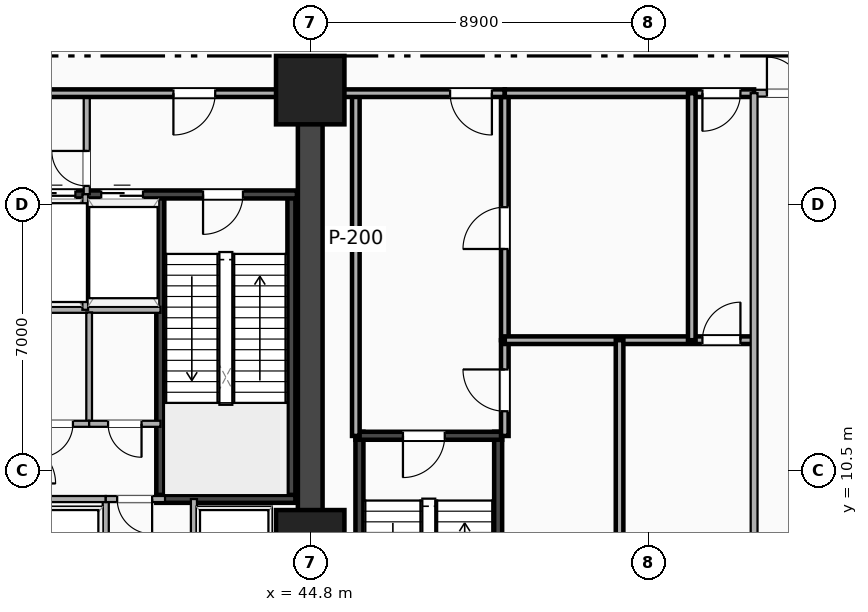
"""IFC4 building model, lengths in metres.
Left out: names, types, materials, properties, quantities, classifications, styles, units other than length and angle.
Written with IfcOpenShell. Run it as: python <this file> out.ifc"""

import sys

from ifc_helpers import new_model, si_unit, direction, frame, frame_2d, origin, origin_2d, place, context, subcontext, project, spatial, rectangle, extrude, element, fill, save


model = new_model("IFC4")
c1 = context("Model", 3, precision=1e-05, world=origin(), true_north=direction((0.0, 1.0)))
c2 = subcontext(c1, "Body", "Model", "MODEL_VIEW")
j1 = project(units=[si_unit("LENGTHUNIT", "METRE"), si_unit("PLANEANGLEUNIT", "RADIAN")], contexts=[c1])
p1 = place(None, origin())
s1 = spatial("IfcSite", under=j1, at=p1, CompositionType="ELEMENT")
p2 = place(p1, origin())
s2 = spatial("IfcBuilding", under=s1, at=p2, CompositionType="ELEMENT")
p3 = place(p2, origin())
s3 = spatial("IfcBuildingStorey", under=s2, at=p3, CompositionType="ELEMENT", Elevation=0.0)
p4 = place(p3, frame((44.8, 3.5, 0.0), z_axis=(0.0, 0.0, 1.0), x_axis=(0.0, 1.0, 0.0)))
e1 = element("IfcWall", 1, at=p4, inside=s3, PredefinedType="SHEAR", context=c2, shape_type="SweptSolid", body=[
    extrude(rectangle(XDim=16.9, YDim=0.65, at=frame_2d((8.45, 0.0))), origin(), (0.0, 0.0, 1.0), 5.1),
])
for number, where, z_axis, x_axis in (
    (2, (40.855, 9.745, 0.0), (0.0, 0.0, 1.0), (0.0, 1.0, 0.0)),
    (3, (44.305, 9.745, 0.0), (0.0, 0.0, 1.0), (0.0, 1.0, 0.0)),
):
    element("IfcWall", number, at=place(p3, frame(where, z_axis=z_axis, x_axis=x_axis)), inside=s3, PredefinedType="SHEAR", context=c2, shape_type="SweptSolid", body=[
        extrude(rectangle(XDim=8.01, YDim=0.21, at=frame_2d((4.005, 0.0))), origin(), (0.0, 0.0, 1.0), 5.1),
    ])
p5 = place(p3, frame((40.75, 9.745, 0.0), z_axis=(0.0, 0.0, 1.0), x_axis=(1.0, 0.0, 0.0)))
e4 = element("IfcWall", 4, at=p5, inside=s3, PredefinedType="SHEAR", context=c2, shape_type="SweptSolid", body=[
    extrude(rectangle(XDim=3.66, YDim=0.21, at=frame_2d((1.83, 0.0))), origin(), (0.0, 0.0, 1.0), 5.1),
])
p6 = place(p3, frame((37.25, 17.755, 0.0), z_axis=(0.0, 0.0, 1.0), x_axis=(1.0, 0.0, 0.0)))
e5 = element("IfcWall", 5, at=p6, inside=s3, PredefinedType="SHEAR", context=c2, shape_type="SweptSolid", body=[
    extrude(rectangle(XDim=7.2, YDim=0.21, at=frame_2d((3.6, 0.0))), origin(), (0.0, 0.0, 1.0), 5.1),
])
p7 = place(p6, frame((0.25, 0.0, 0.0)))
e6 = element("IfcOpeningElement", 6, at=p7, cuts=e5, PredefinedType="OPENING", context=c2, shape_type="SweptSolid", body=[
    extrude(rectangle(XDim=1.12, YDim=2.2, at=frame_2d((0.56, 1.1))), frame((0.0, 0.115, 0.0), z_axis=(0.0, -1.0, 0.0), x_axis=(1.0, 0.0, 0.0)), (0.0, 0.0, 1.0), 0.23),
])
p8 = place(p6, frame((2.05, 0.0, 0.0)))
e7 = element("IfcOpeningElement", 7, at=p8, cuts=e5, PredefinedType="OPENING", context=c2, shape_type="SweptSolid", body=[
    extrude(rectangle(XDim=1.1, YDim=2.18, at=frame_2d((0.55, 1.09))), frame((0.0, 0.115, 0.0), z_axis=(0.0, -1.0, 0.0), x_axis=(1.0, 0.0, 0.0)), (0.0, 0.0, 1.0), 0.23),
])
p9 = place(p6, frame((4.73, 0.0, 0.0)))
e8 = element("IfcOpeningElement", 8, at=p9, cuts=e5, PredefinedType="OPENING", context=c2, shape_type="SweptSolid", body=[
    extrude(rectangle(XDim=1.05, YDim=2.15, at=frame_2d((0.525, 1.075))), frame((0.0, 0.115, 0.0), z_axis=(0.0, -1.0, 0.0), x_axis=(1.0, 0.0, 0.0)), (0.0, 0.0, 1.0), 0.23),
])
for number, where, z_axis, x_axis in (
    (9, (46.095, 2.64, 0.0), (0.0, 0.0, 1.0), (0.0, 1.0, 0.0)),
    (10, (49.745, 2.64, 0.0), (0.0, 0.0, 1.0), (0.0, 1.0, 0.0)),
):
    element("IfcWall", number, at=place(p3, frame(where, z_axis=z_axis, x_axis=x_axis)), inside=s3, PredefinedType="SHEAR", context=c2, shape_type="SweptSolid", body=[
        extrude(rectangle(XDim=8.87, YDim=0.21, at=frame_2d((4.435, 0.0))), origin(), (0.0, 0.0, 1.0), 5.1),
    ])
p10 = place(p3, frame((45.99, 11.405, 0.0), z_axis=(0.0, 0.0, 1.0), x_axis=(1.0, 0.0, 0.0)))
e11 = element("IfcWall", 11, at=p10, inside=s3, PredefinedType="SHEAR", context=c2, shape_type="SweptSolid", body=[
    extrude(rectangle(XDim=3.86, YDim=0.21, at=frame_2d((1.93, 0.0))), origin(), (0.0, 0.0, 1.0), 5.1),
])
p11 = place(p10, frame((1.25, 0.0, 0.0)))
e12 = element("IfcOpeningElement", 12, at=p11, cuts=e11, PredefinedType="OPENING", context=c2, shape_type="SweptSolid", body=[
    extrude(rectangle(XDim=1.1, YDim=2.15, at=frame_2d((0.55, 1.075))), frame((0.0, 0.115, 0.0), z_axis=(0.0, -1.0, 0.0), x_axis=(1.0, 0.0, 0.0)), (0.0, 0.0, 1.0), 0.23),
])
for number, where, z_axis, x_axis in (
    (13, (44.8, 8.55, -0.35), (0.0, 0.0, 1.0), (1.0, 0.0, 0.0)),
    (14, (44.8, 20.5, -0.35), (0.0, 0.0, 1.0), (1.0, 0.0, 0.0)),
):
    element("IfcColumn", number, at=place(p3, frame(where, z_axis=z_axis, x_axis=x_axis)), inside=s3, PredefinedType="COLUMN", context=c2, shape_type="SweptSolid", body=[
        extrude(rectangle(XDim=1.8, YDim=1.8, at=origin_2d()), origin(), (0.0, 0.0, 1.0), 5.45),
    ])
p12 = place(p3, frame((38.92, 17.76, 0.0), z_axis=(0.0, 0.0, 1.0), x_axis=(0.0, 1.0, 0.0)))
e15 = element("IfcWall", 15, at=p12, inside=s3, PredefinedType="PARTITIONING", context=c2, shape_type="SweptSolid", body=[
    extrude(rectangle(XDim=2.66, YDim=0.16, at=frame_2d((1.33, 0.0))), origin(), (0.0, 0.0, 1.0), 4.164),
])
p13 = place(p12, frame((1.14, 0.0, 0.0), z_axis=(0.0, 0.0, 1.0), x_axis=(-1.0, 0.0, 0.0)))
e16 = element("IfcOpeningElement", 16, at=p13, cuts=e15, PredefinedType="OPENING", context=c2, shape_type="SweptSolid", body=[
    extrude(rectangle(XDim=0.92, YDim=2.08, at=frame_2d((0.46, 1.04))), frame((0.0, 0.09, 0.0), z_axis=(0.0, -1.0, 0.0), x_axis=(1.0, 0.0, 0.0)), (0.0, 0.0, 1.0), 0.18),
])
p14 = place(p3, frame((37.25, 14.72, 0.0), z_axis=(0.0, 0.0, 1.0), x_axis=(1.0, 0.0, 0.0)))
e17 = element("IfcWall", 17, at=p14, inside=s3, PredefinedType="PARTITIONING", context=c2, shape_type="SweptSolid", body=[
    extrude(rectangle(XDim=3.61, YDim=0.16, at=frame_2d((1.805, 0.0))), origin(), (0.0, 0.0, 1.0), 4.23),
])
p15 = place(p3, frame((38.88, 14.72, 0.0), z_axis=(0.0, 0.0, 1.0), x_axis=(0.0, 1.0, 0.0)))
e18 = element("IfcWall", 18, at=p15, inside=s3, PredefinedType="PARTITIONING", context=c2, shape_type="SweptSolid", body=[
    extrude(rectangle(XDim=3.04, YDim=0.15, at=frame_2d((1.52, 0.0))), origin(), (0.0, 0.0, 1.0), 5.1),
])
p16 = place(p3, frame((37.0, 20.42, 0.0), z_axis=(0.0, 0.0, 1.0), x_axis=(1.0, 0.0, 0.0)))
e19 = element("IfcWall", 19, at=p16, inside=s3, PredefinedType="PARTITIONING", context=c2, shape_type="SweptSolid", body=[
    extrude(rectangle(XDim=7.45, YDim=0.2, at=frame_2d((3.725, 0.0))), origin(), (0.0, 0.0, 1.0), 4.164),
])
p17 = place(p16, frame((4.2, 0.0, 0.0)))
e20 = element("IfcOpeningElement", 20, at=p17, cuts=e19, PredefinedType="OPENING", context=c2, shape_type="SweptSolid", body=[
    extrude(rectangle(XDim=1.1, YDim=2.15, at=frame_2d((0.55, 1.075))), frame((0.0, 0.11, 0.0), z_axis=(0.0, -1.0, 0.0), x_axis=(1.0, 0.0, 0.0)), (0.0, 0.0, 1.0), 0.22),
])
p18 = place(p3, frame((38.983, 11.72, 0.0), z_axis=(0.0, 0.0, 1.0), x_axis=(0.0, 1.0, 0.0)))
e21 = element("IfcWall", 21, at=p18, inside=s3, PredefinedType="PARTITIONING", context=c2, shape_type="SweptSolid", body=[
    extrude(rectangle(XDim=2.93, YDim=0.15, at=frame_2d((1.465, 0.0))), origin(), (0.0, 0.0, 1.0), 5.1),
])
p19 = place(p3, frame((37.25, 11.72, 0.0), z_axis=(0.0, 0.0, 1.0), x_axis=(1.0, 0.0, 0.0)))
e22 = element("IfcWall", 22, at=p19, inside=s3, PredefinedType="PARTITIONING", context=c2, shape_type="SweptSolid", body=[
    extrude(rectangle(XDim=1.733, YDim=0.16, at=frame_2d((0.866, 0.0))), origin(), (0.0, 0.0, 1.0), 4.23),
])
p20 = place(p19, frame((0.427, 0.0, 0.0)))
e23 = element("IfcOpeningElement", 23, at=p20, cuts=e22, PredefinedType="OPENING", context=c2, shape_type="SweptSolid", body=[
    extrude(rectangle(XDim=0.88, YDim=2.08, at=frame_2d((0.44, 1.04))), frame((0.0, 0.09, 0.0), z_axis=(0.0, -1.0, 0.0), x_axis=(1.0, 0.0, 0.0)), (0.0, 0.0, 1.0), 0.18),
])
p21 = place(p3, frame((38.983, 11.72, 0.0), z_axis=(0.0, 0.0, 1.0), x_axis=(1.0, 0.0, 0.0)))
e24 = element("IfcWall", 24, at=p21, inside=s3, PredefinedType="PARTITIONING", context=c2, shape_type="SweptSolid", body=[
    extrude(rectangle(XDim=1.877, YDim=0.16, at=frame_2d((0.938, 0.0))), origin(), (0.0, 0.0, 1.0), 5.1),
])
p22 = place(p21, frame((0.499, 0.0, 0.0)))
e25 = element("IfcOpeningElement", 25, at=p22, cuts=e24, PredefinedType="OPENING", context=c2, shape_type="SweptSolid", body=[
    extrude(rectangle(XDim=0.88, YDim=2.08, at=frame_2d((0.44, 1.04))), frame((0.0, 0.09, 0.0), z_axis=(0.0, -1.0, 0.0), x_axis=(1.0, 0.0, 0.0)), (0.0, 0.0, 1.0), 0.18),
])
p23 = place(p3, frame((39.42, 3.9, 0.0), z_axis=(0.0, 0.0, 1.0), x_axis=(0.0, 1.0, 0.0)))
e26 = element("IfcWall", 26, at=p23, inside=s3, PredefinedType="PARTITIONING", context=c2, shape_type="SweptSolid", body=[
    extrude(rectangle(XDim=5.84, YDim=0.16, at=frame_2d((2.92, 0.0))), origin(), (0.0, 0.0, 1.0), 4.164),
])
p24 = place(p23, frame((1.86, 0.0, 0.0), z_axis=(0.0, 0.0, 1.0), x_axis=(-1.0, 0.0, 0.0)))
e27 = element("IfcOpeningElement", 27, at=p24, cuts=e26, PredefinedType="OPENING", context=c2, shape_type="SweptSolid", body=[
    extrude(rectangle(XDim=1.06, YDim=2.16, at=frame_2d((0.53, 1.08))), frame((0.0, 0.09, 0.0), z_axis=(0.0, -1.0, 0.0), x_axis=(1.0, 0.0, 0.0)), (0.0, 0.0, 1.0), 0.18),
])
p25 = place(p23, frame((4.76, 0.0, 0.0), z_axis=(0.0, 0.0, 1.0), x_axis=(-1.0, 0.0, 0.0)))
e28 = element("IfcOpeningElement", 28, at=p25, cuts=e26, PredefinedType="OPENING", context=c2, shape_type="SweptSolid", body=[
    extrude(rectangle(XDim=1.06, YDim=2.16, at=frame_2d((0.53, 1.08))), frame((0.0, 0.09, 0.0), z_axis=(0.0, -1.0, 0.0), x_axis=(1.0, 0.0, 0.0)), (0.0, 0.0, 1.0), 0.18),
])
p26 = place(p3, frame((41.74, 3.9, 0.0), z_axis=(0.0, 0.0, 1.0), x_axis=(0.0, 1.0, 0.0)))
e29 = element("IfcWall", 29, at=p26, inside=s3, PredefinedType="PARTITIONING", context=c2, shape_type="SweptSolid", body=[
    extrude(rectangle(XDim=5.84, YDim=0.16, at=frame_2d((2.92, 0.0))), origin(), (0.0, 0.0, 1.0), 4.164),
])
p27 = place(p26, frame((0.8, 0.0, 0.0)))
e30 = element("IfcOpeningElement", 30, at=p27, cuts=e29, PredefinedType="OPENING", context=c2, shape_type="SweptSolid", body=[
    extrude(rectangle(XDim=1.06, YDim=2.16, at=frame_2d((0.53, 1.08))), frame((0.0, 0.09, 0.0), z_axis=(0.0, -1.0, 0.0), x_axis=(1.0, 0.0, 0.0)), (0.0, 0.0, 1.0), 0.18),
])
p28 = place(p26, frame((3.7, 0.0, 0.0)))
e31 = element("IfcOpeningElement", 31, at=p28, cuts=e29, PredefinedType="OPENING", context=c2, shape_type="SweptSolid", body=[
    extrude(rectangle(XDim=1.06, YDim=2.16, at=frame_2d((0.53, 1.08))), frame((0.0, 0.09, 0.0), z_axis=(0.0, -1.0, 0.0), x_axis=(1.0, 0.0, 0.0)), (0.0, 0.0, 1.0), 0.18),
])
p29 = place(p3, frame((37.25, 9.74, 0.0), z_axis=(0.0, 0.0, 1.0), x_axis=(1.0, 0.0, 0.0)))
e32 = element("IfcWall", 32, at=p29, inside=s3, PredefinedType="PARTITIONING", context=c2, shape_type="SweptSolid", body=[
    extrude(rectangle(XDim=2.17, YDim=0.16, at=frame_2d((1.085, 0.0))), origin(), (0.0, 0.0, 1.0), 4.23),
])
p30 = place(p3, frame((39.42, 9.74, 0.0), z_axis=(0.0, 0.0, 1.0), x_axis=(1.0, 0.0, 0.0)))
e33 = element("IfcWall", 33, at=p30, inside=s3, PredefinedType="PARTITIONING", context=c2, shape_type="SweptSolid", body=[
    extrude(rectangle(XDim=1.56, YDim=0.16, at=frame_2d((0.78, 0.0))), origin(), (0.0, 0.0, 1.0), 5.1),
])
p31 = place(p30, frame((0.3, 0.0, 0.0)))
e34 = element("IfcOpeningElement", 34, at=p31, cuts=e33, PredefinedType="OPENING", context=c2, shape_type="SweptSolid", body=[
    extrude(rectangle(XDim=0.92, YDim=2.08, at=frame_2d((0.46, 1.04))), frame((0.0, 0.09, 0.0), z_axis=(0.0, -1.0, 0.0), x_axis=(1.0, 0.0, 0.0)), (0.0, 0.0, 1.0), 0.18),
])
p32 = place(p3, frame((56.48, 20.42, 0.0), z_axis=(0.0, 0.0, 1.0), x_axis=(1.0, 0.0, 0.0)))
e35 = element("IfcWall", 35, at=p32, inside=s3, PredefinedType="PARTITIONING", context=c2, shape_type="SweptSolid", body=[
    extrude(rectangle(XDim=6.8, YDim=0.18, at=frame_2d((3.4, 0.0))), origin(), (0.0, 0.0, 1.0), 4.164),
])
p33 = place(p32, frame((1.288, 0.0, 0.0), z_axis=(0.0, 0.0, 1.0), x_axis=(-1.0, 0.0, 0.0)))
e36 = element("IfcOpeningElement", 36, at=p33, cuts=e35, PredefinedType="OPENING", context=c2, shape_type="SweptSolid", body=[
    extrude(rectangle(XDim=0.95, YDim=2.15, at=frame_2d((0.475, 1.075))), frame((0.0, 0.1, 0.0), z_axis=(0.0, -1.0, 0.0), x_axis=(1.0, 0.0, 0.0)), (0.0, 0.0, 1.0), 0.2),
])
p34 = place(p3, frame((46.0, 11.4, 0.0), z_axis=(0.0, 0.0, 1.0), x_axis=(0.0, 1.0, 0.0)))
e37 = element("IfcWall", 37, at=p34, inside=s3, PredefinedType="PARTITIONING", context=c2, shape_type="SweptSolid", body=[
    extrude(rectangle(XDim=9.02, YDim=0.2, at=frame_2d((4.51, 0.0))), origin(), (0.0, 0.0, 1.0), 4.164),
])
p35 = place(p3, frame((49.92, 11.4, 0.0), z_axis=(0.0, 0.0, 1.0), x_axis=(0.0, 1.0, 0.0)))
e38 = element("IfcWall", 38, at=p35, inside=s3, PredefinedType="PARTITIONING", context=c2, shape_type="SweptSolid", body=[
    extrude(rectangle(XDim=2.52, YDim=0.2, at=frame_2d((1.26, 0.0))), origin(), (0.0, 0.0, 1.0), 5.1),
])
p36 = place(p35, frame((1.75, 0.0, 0.0), z_axis=(0.0, 0.0, 1.0), x_axis=(-1.0, 0.0, 0.0)))
e39 = element("IfcOpeningElement", 39, at=p36, cuts=e38, PredefinedType="OPENING", context=c2, shape_type="SweptSolid", body=[
    extrude(rectangle(XDim=1.1, YDim=2.15, at=frame_2d((0.55, 1.075))), frame((0.0, 0.11, 0.0), z_axis=(0.0, -1.0, 0.0), x_axis=(1.0, 0.0, 0.0)), (0.0, 0.0, 1.0), 0.22),
])
p37 = place(p3, frame((49.92, 13.92, 0.0), z_axis=(0.0, 0.0, 1.0), x_axis=(0.0, 1.0, 0.0)))
e40 = element("IfcWall", 40, at=p37, inside=s3, PredefinedType="PARTITIONING", context=c2, shape_type="SweptSolid", body=[
    extrude(rectangle(XDim=6.5, YDim=0.2, at=frame_2d((3.25, 0.0))), origin(), (0.0, 0.0, 1.0), 4.164),
])
p38 = place(p37, frame((3.5, 0.0, 0.0), z_axis=(0.0, 0.0, 1.0), x_axis=(-1.0, 0.0, 0.0)))
e41 = element("IfcOpeningElement", 41, at=p38, cuts=e40, PredefinedType="OPENING", context=c2, shape_type="SweptSolid", body=[
    extrude(rectangle(XDim=1.1, YDim=2.15, at=frame_2d((0.55, 1.075))), frame((0.0, 0.11, 0.0), z_axis=(0.0, -1.0, 0.0), x_axis=(1.0, 0.0, 0.0)), (0.0, 0.0, 1.0), 0.22),
])
p39 = place(p3, frame((44.8, 20.42, 0.0), z_axis=(0.0, 0.0, 1.0), x_axis=(1.0, 0.0, 0.0)))
e42 = element("IfcWall", 42, at=p39, inside=s3, PredefinedType="PARTITIONING", context=c2, shape_type="SweptSolid", body=[
    extrude(rectangle(XDim=5.12, YDim=0.2, at=frame_2d((2.56, 0.0))), origin(), (0.0, 0.0, 1.0), 4.164),
])
p40 = place(p39, frame((3.681, 0.0, 0.0)))
e43 = element("IfcOpeningElement", 43, at=p40, cuts=e42, PredefinedType="OPENING", context=c2, shape_type="SweptSolid", body=[
    extrude(rectangle(XDim=1.1, YDim=2.15, at=frame_2d((0.55, 1.075))), frame((0.0, 0.11, 0.0), z_axis=(0.0, -1.0, 0.0), x_axis=(1.0, 0.0, 0.0)), (0.0, 0.0, 1.0), 0.22),
])
p41 = place(p3, frame((49.92, 20.42, 0.0), z_axis=(0.0, 0.0, 1.0), x_axis=(1.0, 0.0, 0.0)))
e44 = element("IfcWall", 44, at=p41, inside=s3, PredefinedType="PARTITIONING", context=c2, shape_type="SweptSolid", body=[
    extrude(rectangle(XDim=6.56, YDim=0.2, at=frame_2d((3.28, 0.0))), origin(), (0.0, 0.0, 1.0), 4.164),
])
p42 = place(p41, frame((5.2, 0.0, 0.0)))
e45 = element("IfcOpeningElement", 45, at=p42, cuts=e44, PredefinedType="OPENING", context=c2, shape_type="SweptSolid", body=[
    extrude(rectangle(XDim=1.0, YDim=2.15, at=frame_2d((0.5, 1.075))), frame((0.0, 0.11, 0.0), z_axis=(0.0, -1.0, 0.0), x_axis=(1.0, 0.0, 0.0)), (0.0, 0.0, 1.0), 0.22),
])
p43 = place(p3, frame((49.92, 13.92, 0.0), z_axis=(0.0, 0.0, 1.0), x_axis=(1.0, 0.0, 0.0)))
e46 = element("IfcWall", 46, at=p43, inside=s3, PredefinedType="PARTITIONING", context=c2, shape_type="SweptSolid", body=[
    extrude(rectangle(XDim=6.56, YDim=0.2, at=frame_2d((3.28, 0.0))), origin(), (0.0, 0.0, 1.0), 5.1),
])
p44 = place(p43, frame((6.2, 0.0, 0.0), z_axis=(0.0, 0.0, 1.0), x_axis=(-1.0, 0.0, 0.0)))
e47 = element("IfcOpeningElement", 47, at=p44, cuts=e46, PredefinedType="OPENING", context=c2, shape_type="SweptSolid", body=[
    extrude(rectangle(XDim=1.0, YDim=2.15, at=frame_2d((0.5, 1.075))), frame((0.0, 0.11, 0.0), z_axis=(0.0, -1.0, 0.0), x_axis=(1.0, 0.0, 0.0)), (0.0, 0.0, 1.0), 0.22),
])
p45 = place(p3, frame((56.48, 0.35, 0.0), z_axis=(0.0, 0.0, 1.0), x_axis=(0.0, 1.0, 0.0)))
e48 = element("IfcWall", 48, at=p45, inside=s3, PredefinedType="PARTITIONING", context=c2, shape_type="SweptSolid", body=[
    extrude(rectangle(XDim=20.07, YDim=0.18, at=frame_2d((10.035, 0.0))), origin(), (0.0, 0.0, 1.0), 4.164),
])
p46 = place(p3, frame((52.94, 0.35, 0.0), z_axis=(0.0, 0.0, 1.0), x_axis=(0.0, 1.0, 0.0)))
e49 = element("IfcWall", 49, at=p46, inside=s3, PredefinedType="PARTITIONING", context=c2, shape_type="SweptSolid", body=[
    extrude(rectangle(XDim=13.57, YDim=0.2, at=frame_2d((6.785, 0.0))), origin(), (0.0, 0.0, 1.0), 2.735),
])
p47 = place(p3, frame((54.84, 13.92, 0.0), z_axis=(0.0, 0.0, 1.0), x_axis=(0.0, 1.0, 0.0)))
e50 = element("IfcWall", 50, at=p47, inside=s3, PredefinedType="PARTITIONING", context=c2, shape_type="SweptSolid", body=[
    extrude(rectangle(XDim=6.5, YDim=0.2, at=frame_2d((3.25, 0.0))), origin(), (0.0, 0.0, 1.0), 4.164),
])
p48 = place(p7, origin())
e51 = element("IfcDoor", 51, at=p48, inside=s3, OperationType="DOUBLE_DOOR_SLIDING", PredefinedType="DOOR", context=c2, shape_type="SweptSolid", body=[
    extrude(rectangle(XDim=1.12, YDim=2.2, at=frame_2d((0.56, 1.1))), frame((0.0, 0.025, 0.0), z_axis=(0.0, -1.0, 0.0), x_axis=(1.0, 0.0, 0.0)), (0.0, 0.0, 1.0), 0.05),
])
fill(e6, e51)
p49 = place(p8, origin())
e52 = element("IfcDoor", 52, at=p49, inside=s3, OperationType="DOUBLE_DOOR_SLIDING", PredefinedType="DOOR", context=c2, shape_type="SweptSolid", body=[
    extrude(rectangle(XDim=1.1, YDim=2.18, at=frame_2d((0.55, 1.09))), frame((0.0, 0.025, 0.0), z_axis=(0.0, -1.0, 0.0), x_axis=(1.0, 0.0, 0.0)), (0.0, 0.0, 1.0), 0.05),
])
fill(e7, e52)
p50 = place(p9, origin())
e53 = element("IfcDoor", 53, at=p50, inside=s3, OperationType="SINGLE_SWING_LEFT", PredefinedType="DOOR", context=c2, shape_type="SweptSolid", body=[
    extrude(rectangle(XDim=1.05, YDim=2.15, at=frame_2d((0.525, 1.075))), frame((0.0, 0.025, 0.0), z_axis=(0.0, -1.0, 0.0), x_axis=(1.0, 0.0, 0.0)), (0.0, 0.0, 1.0), 0.05),
])
fill(e8, e53)
p51 = place(p11, origin())
e54 = element("IfcDoor", 54, at=p51, inside=s3, OperationType="SINGLE_SWING_LEFT", PredefinedType="DOOR", context=c2, shape_type="SweptSolid", body=[
    extrude(rectangle(XDim=1.1, YDim=2.15, at=frame_2d((0.55, 1.075))), frame((0.0, 0.025, 0.0), z_axis=(0.0, -1.0, 0.0), x_axis=(1.0, 0.0, 0.0)), (0.0, 0.0, 1.0), 0.05),
])
fill(e12, e54)
p52 = place(p13, origin())
e55 = element("IfcDoor", 55, at=p52, inside=s3, OperationType="SINGLE_SWING_RIGHT", PredefinedType="DOOR", context=c2, shape_type="SweptSolid", body=[
    extrude(rectangle(XDim=0.92, YDim=2.08, at=frame_2d((0.46, 1.04))), frame((0.0, 0.025, 0.0), z_axis=(0.0, -1.0, 0.0), x_axis=(1.0, 0.0, 0.0)), (0.0, 0.0, 1.0), 0.05),
])
fill(e16, e55)
p53 = place(p17, origin())
e56 = element("IfcDoor", 56, at=p53, inside=s3, OperationType="SINGLE_SWING_LEFT", PredefinedType="DOOR", context=c2, shape_type="SweptSolid", body=[
    extrude(rectangle(XDim=1.1, YDim=2.15, at=frame_2d((0.55, 1.075))), frame((0.0, 0.025, 0.0), z_axis=(0.0, -1.0, 0.0), x_axis=(1.0, 0.0, 0.0)), (0.0, 0.0, 1.0), 0.05),
])
fill(e20, e56)
p54 = place(p20, origin())
e57 = element("IfcDoor", 57, at=p54, inside=s3, OperationType="SINGLE_SWING_LEFT", PredefinedType="DOOR", context=c2, shape_type="SweptSolid", body=[
    extrude(rectangle(XDim=0.88, YDim=2.08, at=frame_2d((0.44, 1.04))), frame((0.0, 0.025, 0.0), z_axis=(0.0, -1.0, 0.0), x_axis=(1.0, 0.0, 0.0)), (0.0, 0.0, 1.0), 0.05),
])
fill(e23, e57)
p55 = place(p22, origin())
e58 = element("IfcDoor", 58, at=p55, inside=s3, OperationType="SINGLE_SWING_RIGHT", PredefinedType="DOOR", context=c2, shape_type="SweptSolid", body=[
    extrude(rectangle(XDim=0.88, YDim=2.08, at=frame_2d((0.44, 1.04))), frame((0.0, 0.025, 0.0), z_axis=(0.0, -1.0, 0.0), x_axis=(1.0, 0.0, 0.0)), (0.0, 0.0, 1.0), 0.05),
])
fill(e25, e58)
p56 = place(p31, origin())
e59 = element("IfcDoor", 59, at=p56, inside=s3, OperationType="SINGLE_SWING_RIGHT", PredefinedType="DOOR", context=c2, shape_type="SweptSolid", body=[
    extrude(rectangle(XDim=0.92, YDim=2.08, at=frame_2d((0.46, 1.04))), frame((0.0, 0.025, 0.0), z_axis=(0.0, -1.0, 0.0), x_axis=(1.0, 0.0, 0.0)), (0.0, 0.0, 1.0), 0.05),
])
fill(e34, e59)
p57 = place(p33, origin())
e60 = element("IfcDoor", 60, at=p57, inside=s3, OperationType="SINGLE_SWING_LEFT", PredefinedType="DOOR", context=c2, shape_type="SweptSolid", body=[
    extrude(rectangle(XDim=0.95, YDim=2.15, at=frame_2d((0.475, 1.075))), frame((0.0, 0.025, 0.0), z_axis=(0.0, -1.0, 0.0), x_axis=(1.0, 0.0, 0.0)), (0.0, 0.0, 1.0), 0.05),
])
fill(e36, e60)
p58 = place(p36, origin())
e61 = element("IfcDoor", 61, at=p58, inside=s3, OperationType="SINGLE_SWING_RIGHT", PredefinedType="DOOR", context=c2, shape_type="SweptSolid", body=[
    extrude(rectangle(XDim=1.1, YDim=2.15, at=frame_2d((0.55, 1.075))), frame((0.0, 0.025, 0.0), z_axis=(0.0, -1.0, 0.0), x_axis=(1.0, 0.0, 0.0)), (0.0, 0.0, 1.0), 0.05),
])
fill(e39, e61)
p59 = place(p38, origin())
e62 = element("IfcDoor", 62, at=p59, inside=s3, OperationType="SINGLE_SWING_LEFT", PredefinedType="DOOR", context=c2, shape_type="SweptSolid", body=[
    extrude(rectangle(XDim=1.1, YDim=2.15, at=frame_2d((0.55, 1.075))), frame((0.0, 0.025, 0.0), z_axis=(0.0, -1.0, 0.0), x_axis=(1.0, 0.0, 0.0)), (0.0, 0.0, 1.0), 0.05),
])
fill(e41, e62)
p60 = place(p40, origin())
e63 = element("IfcDoor", 63, at=p60, inside=s3, OperationType="SINGLE_SWING_RIGHT", PredefinedType="DOOR", context=c2, shape_type="SweptSolid", body=[
    extrude(rectangle(XDim=1.1, YDim=2.15, at=frame_2d((0.55, 1.075))), frame((0.0, 0.025, 0.0), z_axis=(0.0, -1.0, 0.0), x_axis=(1.0, 0.0, 0.0)), (0.0, 0.0, 1.0), 0.05),
])
fill(e43, e63)
p61 = place(p42, origin())
e64 = element("IfcDoor", 64, at=p61, inside=s3, OperationType="SINGLE_SWING_LEFT", PredefinedType="DOOR", context=c2, shape_type="SweptSolid", body=[
    extrude(rectangle(XDim=1.0, YDim=2.15, at=frame_2d((0.5, 1.075))), frame((0.0, 0.025, 0.0), z_axis=(0.0, -1.0, 0.0), x_axis=(1.0, 0.0, 0.0)), (0.0, 0.0, 1.0), 0.05),
])
fill(e45, e64)
p62 = place(p44, origin())
e65 = element("IfcDoor", 65, at=p62, inside=s3, OperationType="SINGLE_SWING_RIGHT", PredefinedType="DOOR", context=c2, shape_type="SweptSolid", body=[
    extrude(rectangle(XDim=1.0, YDim=2.15, at=frame_2d((0.5, 1.075))), frame((0.0, 0.025, 0.0), z_axis=(0.0, -1.0, 0.0), x_axis=(1.0, 0.0, 0.0)), (0.0, 0.0, 1.0), 0.05),
])
fill(e47, e65)
save(model, sys.argv[1])
